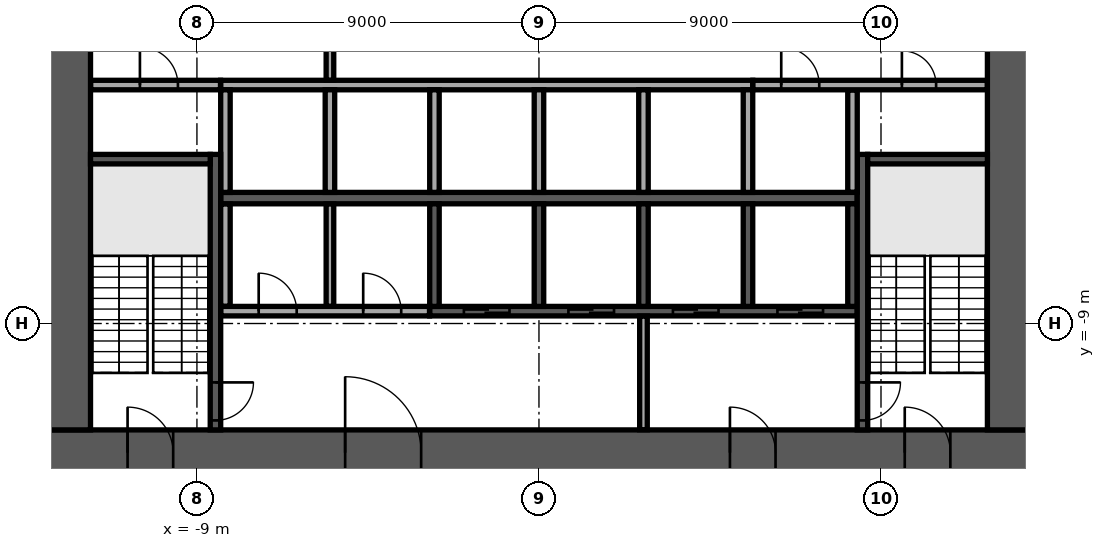
"""IFC4 building model, lengths in metres.
Left out: names, types, materials, properties, quantities, classifications, styles, units other than length and angle.
Written with IfcOpenShell. Run it as: python <this file> out.ifc"""

import sys

from ifc_helpers import new_model, si_unit, direction, frame, frame_2d, origin, place, context, subcontext, project, spatial, rectangle, extrude, element, fill, save


model = new_model("IFC4")
c1 = context("Model", 3, precision=1e-05, world=origin(), true_north=direction((0.0, 1.0)))
c2 = subcontext(c1, "Body", "Model", "MODEL_VIEW")
j1 = project(units=[si_unit("LENGTHUNIT", "METRE"), si_unit("PLANEANGLEUNIT", "RADIAN")], contexts=[c1])
p1 = place(None, origin())
s1 = spatial("IfcSite", under=j1, at=p1, CompositionType="ELEMENT")
p2 = place(p1, origin())
s2 = spatial("IfcBuilding", under=s1, at=p2, CompositionType="ELEMENT")
p3 = place(p2, frame((0.0, 0.0, 13.5)))
s3 = spatial("IfcBuildingStorey", under=s2, at=p3, CompositionType="ELEMENT", Elevation=13.5)
p4 = place(p3, frame((-13.0, -12.4, 0.0), z_axis=(0.0, 0.0, 1.0), x_axis=(1.0, 0.0, 0.0)))
e1 = element("IfcWall", 1, at=p4, inside=s3, PredefinedType="SHEAR", context=c2, shape_type="SweptSolid", body=[
    extrude(rectangle(XDim=26.0, YDim=1.2, at=frame_2d((13.0, 0.0))), origin(), (0.0, 0.0, 1.0), 4.1),
])
p5 = place(p4, frame((7.9, 0.0, 0.0)))
e2 = element("IfcOpeningElement", 2, at=p5, cuts=e1, PredefinedType="OPENING", context=c2, shape_type="SweptSolid", body=[
    extrude(rectangle(XDim=2.0, YDim=2.1, at=frame_2d((1.0, 1.05))), frame((0.0, 0.61, 0.0), z_axis=(0.0, -1.0, 0.0), x_axis=(1.0, 0.0, 0.0)), (0.0, 0.0, 1.0), 1.22),
])
p6 = place(p4, frame((18.025, 0.0, 0.0)))
e3 = element("IfcOpeningElement", 3, at=p6, cuts=e1, PredefinedType="OPENING", context=c2, shape_type="SweptSolid", body=[
    extrude(rectangle(XDim=1.2, YDim=2.1, at=frame_2d((0.6, 1.05))), frame((0.0, 0.61, 0.0), z_axis=(0.0, -1.0, 0.0), x_axis=(1.0, 0.0, 0.0)), (0.0, 0.0, 1.0), 1.22),
])
p7 = place(p4, frame((2.175, 0.0, 0.0)))
e4 = element("IfcOpeningElement", 4, at=p7, cuts=e1, PredefinedType="OPENING", context=c2, shape_type="SweptSolid", body=[
    extrude(rectangle(XDim=1.2, YDim=2.1, at=frame_2d((0.6, 1.05))), frame((0.0, 0.61, 0.0), z_axis=(0.0, -1.0, 0.0), x_axis=(1.0, 0.0, 0.0)), (0.0, 0.0, 1.0), 1.22),
])
p8 = place(p4, frame((22.625, 0.0, 0.0)))
e5 = element("IfcOpeningElement", 5, at=p8, cuts=e1, PredefinedType="OPENING", context=c2, shape_type="SweptSolid", body=[
    extrude(rectangle(XDim=1.2, YDim=2.1, at=frame_2d((0.6, 1.05))), frame((0.0, 0.61, 0.0), z_axis=(0.0, -1.0, 0.0), x_axis=(1.0, 0.0, 0.0)), (0.0, 0.0, 1.0), 1.22),
])
p9 = place(p3, frame((12.4, -11.8, 0.0), z_axis=(0.0, 0.0, 1.0), x_axis=(0.0, 1.0, 0.0)))
e6 = element("IfcWall", 6, at=p9, inside=s3, PredefinedType="SHEAR", context=c2, shape_type="SweptSolid", body=[
    extrude(rectangle(XDim=23.6, YDim=1.2, at=frame_2d((11.8, 0.0))), origin(), (0.0, 0.0, 1.0), 4.1),
])
p10 = place(p9, frame((10.6, 0.0, 0.0)))
e7 = element("IfcOpeningElement", 7, at=p10, cuts=e6, PredefinedType="OPENING", context=c2, shape_type="SweptSolid", body=[
    extrude(rectangle(XDim=2.4, YDim=2.4, at=frame_2d((1.2, 1.2))), frame((0.0, 0.61, 0.0), z_axis=(0.0, -1.0, 0.0), x_axis=(1.0, 0.0, 0.0)), (0.0, 0.0, 1.0), 1.22),
])
p11 = place(p3, frame((-12.4, -11.8, 0.0), z_axis=(0.0, 0.0, 1.0), x_axis=(0.0, 1.0, 0.0)))
e8 = element("IfcWall", 8, at=p11, inside=s3, PredefinedType="SHEAR", context=c2, shape_type="SweptSolid", body=[
    extrude(rectangle(XDim=23.6, YDim=1.2, at=frame_2d((11.8, 0.0))), origin(), (0.0, 0.0, 1.0), 4.1),
])
p12 = place(p11, frame((10.6, 0.0, 0.0)))
e9 = element("IfcOpeningElement", 9, at=p12, cuts=e8, PredefinedType="OPENING", context=c2, shape_type="SweptSolid", body=[
    extrude(rectangle(XDim=2.4, YDim=2.4, at=frame_2d((1.2, 1.2))), frame((0.0, 0.61, 0.0), z_axis=(0.0, -1.0, 0.0), x_axis=(1.0, 0.0, 0.0)), (0.0, 0.0, 1.0), 1.22),
])
p13 = place(p3, frame((-8.375, -5.7, 0.0), z_axis=(0.0, 0.0, 1.0), x_axis=(1.0, 0.0, 0.0)))
e10 = element("IfcWall", 10, at=p13, inside=s3, PredefinedType="SOLIDWALL", context=c2, shape_type="SweptSolid", body=[
    extrude(rectangle(XDim=16.75, YDim=0.3, at=frame_2d((8.375, 0.0))), origin(), (0.0, 0.0, 1.0), 4.1),
])
p14 = place(p3, frame((-8.375, -2.725, 0.0), z_axis=(0.0, 0.0, 1.0), x_axis=(1.0, 0.0, 0.0)))
e11 = element("IfcWall", 11, at=p14, inside=s3, PredefinedType="SOLIDWALL", context=c2, shape_type="SweptSolid", body=[
    extrude(rectangle(XDim=14.0, YDim=0.25, at=frame_2d((7.0, 0.0))), origin(), (0.0, 0.0, 1.0), 4.1),
])
for number, where, z_axis, x_axis in (
    (12, (-8.25, -5.55, 0.0), (0.0, 0.0, 1.0), (0.0, 1.0, 0.0)),
    (13, (-5.5, -5.55, 0.0), (0.0, 0.0, 1.0), (0.0, 1.0, 0.0)),
    (14, (-2.75, -5.55, 0.0), (0.0, 0.0, 1.0), (0.0, 1.0, 0.0)),
    (15, (0.0, -5.55, 0.0), (0.0, 0.0, 1.0), (0.0, 1.0, 0.0)),
    (16, (2.75, -5.55, 0.0), (0.0, 0.0, 1.0), (0.0, 1.0, 0.0)),
    (17, (5.5, -5.55, 0.0), (0.0, 0.0, 1.0), (0.0, 1.0, 0.0)),
):
    element("IfcWall", number, at=place(p3, frame(where, z_axis=z_axis, x_axis=x_axis)), inside=s3, PredefinedType="SOLIDWALL", context=c2, shape_type="SweptSolid", body=[
        extrude(rectangle(XDim=2.7, YDim=0.25, at=frame_2d((1.35, 0.0))), origin(), (0.0, 0.0, 1.0), 4.1),
    ])
p15 = place(p3, frame((-2.875, -8.675, 0.0), z_axis=(0.0, 0.0, 1.0), x_axis=(1.0, 0.0, 0.0)))
e18 = element("IfcWall", 18, at=p15, inside=s3, PredefinedType="SOLIDWALL", context=c2, shape_type="SweptSolid", body=[
    extrude(rectangle(XDim=11.25, YDim=0.25, at=frame_2d((5.625, 0.0))), origin(), (0.0, 0.0, 1.0), 4.1),
])
p16 = place(p15, frame((0.9, 0.0, 0.0)))
e19 = element("IfcOpeningElement", 19, at=p16, cuts=e18, PredefinedType="OPENING", context=c2, shape_type="SweptSolid", body=[
    extrude(rectangle(XDim=1.2, YDim=2.1, at=frame_2d((0.6, 1.05))), frame((0.0, 0.135, 0.0), z_axis=(0.0, -1.0, 0.0), x_axis=(1.0, 0.0, 0.0)), (0.0, 0.0, 1.0), 0.27),
])
p17 = place(p15, frame((3.65, 0.0, 0.0)))
e20 = element("IfcOpeningElement", 20, at=p17, cuts=e18, PredefinedType="OPENING", context=c2, shape_type="SweptSolid", body=[
    extrude(rectangle(XDim=1.2, YDim=2.1, at=frame_2d((0.6, 1.05))), frame((0.0, 0.135, 0.0), z_axis=(0.0, -1.0, 0.0), x_axis=(1.0, 0.0, 0.0)), (0.0, 0.0, 1.0), 0.27),
])
p18 = place(p15, frame((6.4, 0.0, 0.0)))
e21 = element("IfcOpeningElement", 21, at=p18, cuts=e18, PredefinedType="OPENING", context=c2, shape_type="SweptSolid", body=[
    extrude(rectangle(XDim=1.2, YDim=2.1, at=frame_2d((0.6, 1.05))), frame((0.0, 0.135, 0.0), z_axis=(0.0, -1.0, 0.0), x_axis=(1.0, 0.0, 0.0)), (0.0, 0.0, 1.0), 0.27),
])
p19 = place(p15, frame((9.15, 0.0, 0.0)))
e22 = element("IfcOpeningElement", 22, at=p19, cuts=e18, PredefinedType="OPENING", context=c2, shape_type="SweptSolid", body=[
    extrude(rectangle(XDim=1.2, YDim=2.1, at=frame_2d((0.6, 1.05))), frame((0.0, 0.135, 0.0), z_axis=(0.0, -1.0, 0.0), x_axis=(1.0, 0.0, 0.0)), (0.0, 0.0, 1.0), 0.27),
])
for number, where, z_axis, x_axis in (
    (23, (-2.75, -8.55, 0.0), (0.0, 0.0, 1.0), (0.0, 1.0, 0.0)),
    (24, (0.0, -8.55, 0.0), (0.0, 0.0, 1.0), (0.0, 1.0, 0.0)),
    (25, (2.75, -8.55, 0.0), (0.0, 0.0, 1.0), (0.0, 1.0, 0.0)),
    (26, (5.5, -8.55, 0.0), (0.0, 0.0, 1.0), (0.0, 1.0, 0.0)),
    (27, (8.25, -8.55, 0.0), (0.0, 0.0, 1.0), (0.0, 1.0, 0.0)),
):
    element("IfcWall", number, at=place(p3, frame(where, z_axis=z_axis, x_axis=x_axis)), inside=s3, PredefinedType="SOLIDWALL", context=c2, shape_type="SweptSolid", body=[
        extrude(rectangle(XDim=2.7, YDim=0.25, at=frame_2d((1.35, 0.0))), origin(), (0.0, 0.0, 1.0), 4.1),
    ])
p20 = place(p3, frame((-8.512, -4.55, 0.0), z_axis=(0.0, 0.0, 1.0), x_axis=(0.0, -1.0, 0.0)))
e28 = element("IfcWall", 28, at=p20, inside=s3, PredefinedType="SOLIDWALL", context=c2, shape_type="SweptSolid", body=[
    extrude(rectangle(XDim=7.25, YDim=0.275, at=frame_2d((3.625, 0.0))), origin(), (0.0, 0.0, 1.0), 4.1),
])
p21 = place(p20, frame((6.0, 0.0, 0.0)))
e29 = element("IfcOpeningElement", 29, at=p21, cuts=e28, PredefinedType="OPENING", context=c2, shape_type="SweptSolid", body=[
    extrude(rectangle(XDim=1.0, YDim=2.1, at=frame_2d((0.5, 1.05))), frame((0.0, 0.147, 0.0), z_axis=(0.0, -1.0, 0.0), x_axis=(1.0, 0.0, 0.0)), (0.0, 0.0, 1.0), 0.295),
])
p22 = place(p3, frame((-8.65, -4.675, 0.0), z_axis=(0.0, 0.0, 1.0), x_axis=(-1.0, 0.0, 0.0)))
e30 = element("IfcWall", 30, at=p22, inside=s3, PredefinedType="SOLIDWALL", context=c2, shape_type="SweptSolid", body=[
    extrude(rectangle(XDim=3.15, YDim=0.25, at=frame_2d((1.575, 0.0))), origin(), (0.0, 0.0, 1.0), 4.1),
])
p23 = place(p3, frame((8.512, -4.55, 0.0), z_axis=(0.0, 0.0, 1.0), x_axis=(0.0, -1.0, 0.0)))
e31 = element("IfcWall", 31, at=p23, inside=s3, PredefinedType="SOLIDWALL", context=c2, shape_type="SweptSolid", body=[
    extrude(rectangle(XDim=7.25, YDim=0.275, at=frame_2d((3.625, 0.0))), origin(), (0.0, 0.0, 1.0), 4.1),
])
p24 = place(p23, frame((6.0, 0.0, 0.0)))
e32 = element("IfcOpeningElement", 32, at=p24, cuts=e31, PredefinedType="OPENING", context=c2, shape_type="SweptSolid", body=[
    extrude(rectangle(XDim=1.0, YDim=2.1, at=frame_2d((0.5, 1.05))), frame((0.0, 0.147, 0.0), z_axis=(0.0, -1.0, 0.0), x_axis=(1.0, 0.0, 0.0)), (0.0, 0.0, 1.0), 0.295),
])
p25 = place(p3, frame((8.65, -4.675, 0.0), z_axis=(0.0, 0.0, 1.0), x_axis=(1.0, 0.0, 0.0)))
e33 = element("IfcWall", 33, at=p25, inside=s3, PredefinedType="SOLIDWALL", context=c2, shape_type="SweptSolid", body=[
    extrude(rectangle(XDim=3.15, YDim=0.25, at=frame_2d((1.575, 0.0))), origin(), (0.0, 0.0, 1.0), 4.1),
])
p26 = place(p3, frame((2.75, -11.795, 0.0), z_axis=(0.0, 0.0, 1.0), x_axis=(0.0, 1.0, 0.0)))
e34 = element("IfcWall", 34, at=p26, inside=s3, PredefinedType="PARTITIONING", context=c2, shape_type="SweptSolid", body=[
    extrude(rectangle(XDim=2.99, YDim=0.2, at=frame_2d((1.495, 0.0))), origin(), (0.0, 0.0, 1.0), 4.1),
])
p27 = place(p3, frame((-8.37, -8.675, 0.0), z_axis=(0.0, 0.0, 1.0), x_axis=(1.0, 0.0, 0.0)))
e35 = element("IfcWall", 35, at=p27, inside=s3, PredefinedType="PARTITIONING", context=c2, shape_type="SweptSolid", body=[
    extrude(rectangle(XDim=5.49, YDim=0.25, at=frame_2d((2.745, 0.0))), origin(), (0.0, 0.0, 1.0), 4.1),
])
p28 = place(p27, frame((0.995, 0.0, 0.0)))
e36 = element("IfcOpeningElement", 36, at=p28, cuts=e35, PredefinedType="OPENING", context=c2, shape_type="SweptSolid", body=[
    extrude(rectangle(XDim=1.0, YDim=2.1, at=frame_2d((0.5, 1.05))), frame((0.0, 0.135, 0.0), z_axis=(0.0, -1.0, 0.0), x_axis=(1.0, 0.0, 0.0)), (0.0, 0.0, 1.0), 0.27),
])
p29 = place(p27, frame((3.745, 0.0, 0.0)))
e37 = element("IfcOpeningElement", 37, at=p29, cuts=e35, PredefinedType="OPENING", context=c2, shape_type="SweptSolid", body=[
    extrude(rectangle(XDim=1.0, YDim=2.1, at=frame_2d((0.5, 1.05))), frame((0.0, 0.135, 0.0), z_axis=(0.0, -1.0, 0.0), x_axis=(1.0, 0.0, 0.0)), (0.0, 0.0, 1.0), 0.27),
])
p30 = place(p3, frame((-8.25, -8.545, 0.0), z_axis=(0.0, 0.0, 1.0), x_axis=(0.0, 1.0, 0.0)))
e38 = element("IfcWall", 38, at=p30, inside=s3, PredefinedType="PARTITIONING", context=c2, shape_type="SweptSolid", body=[
    extrude(rectangle(XDim=2.69, YDim=0.25, at=frame_2d((1.345, 0.0))), origin(), (0.0, 0.0, 1.0), 4.1),
])
p31 = place(p3, frame((-5.5, -8.545, 0.0), z_axis=(0.0, 0.0, 1.0), x_axis=(0.0, 1.0, 0.0)))
e39 = element("IfcWall", 39, at=p31, inside=s3, PredefinedType="PARTITIONING", context=c2, shape_type="SweptSolid", body=[
    extrude(rectangle(XDim=2.69, YDim=0.2, at=frame_2d((1.345, 0.0))), origin(), (0.0, 0.0, 1.0), 4.1),
])
p32 = place(p3, frame((8.25, -5.545, 0.0), z_axis=(0.0, 0.0, 1.0), x_axis=(0.0, 1.0, 0.0)))
e40 = element("IfcWall", 40, at=p32, inside=s3, PredefinedType="PARTITIONING", context=c2, shape_type="SweptSolid", body=[
    extrude(rectangle(XDim=2.69, YDim=0.25, at=frame_2d((1.345, 0.0))), origin(), (0.0, 0.0, 1.0), 4.1),
])
p33 = place(p3, frame((-11.795, -2.725, 0.0), z_axis=(0.0, 0.0, 1.0), x_axis=(1.0, 0.0, 0.0)))
e41 = element("IfcWall", 41, at=p33, inside=s3, PredefinedType="PARTITIONING", context=c2, shape_type="SweptSolid", body=[
    extrude(rectangle(XDim=3.415, YDim=0.25, at=frame_2d((1.708, 0.0))), origin(), (0.0, 0.0, 1.0), 4.1),
])
p34 = place(p33, frame((1.295, 0.0, 0.0)))
e42 = element("IfcOpeningElement", 42, at=p34, cuts=e41, PredefinedType="OPENING", context=c2, shape_type="SweptSolid", body=[
    extrude(rectangle(XDim=1.0, YDim=2.1, at=frame_2d((0.5, 1.05))), frame((0.0, 0.135, 0.0), z_axis=(0.0, -1.0, 0.0), x_axis=(1.0, 0.0, 0.0)), (0.0, 0.0, 1.0), 0.27),
])
p35 = place(p3, frame((5.63, -2.725, 0.0), z_axis=(0.0, 0.0, 1.0), x_axis=(1.0, 0.0, 0.0)))
e43 = element("IfcWall", 43, at=p35, inside=s3, PredefinedType="PARTITIONING", context=c2, shape_type="SweptSolid", body=[
    extrude(rectangle(XDim=6.165, YDim=0.25, at=frame_2d((3.083, 0.0))), origin(), (0.0, 0.0, 1.0), 4.1),
])
p36 = place(p35, frame((0.745, 0.0, 0.0)))
e44 = element("IfcOpeningElement", 44, at=p36, cuts=e43, PredefinedType="OPENING", context=c2, shape_type="SweptSolid", body=[
    extrude(rectangle(XDim=1.0, YDim=2.1, at=frame_2d((0.5, 1.05))), frame((0.0, 0.135, 0.0), z_axis=(0.0, -1.0, 0.0), x_axis=(1.0, 0.0, 0.0)), (0.0, 0.0, 1.0), 0.27),
])
p37 = place(p35, frame((3.92, 0.0, 0.0)))
e45 = element("IfcOpeningElement", 45, at=p37, cuts=e43, PredefinedType="OPENING", context=c2, shape_type="SweptSolid", body=[
    extrude(rectangle(XDim=0.9, YDim=2.1, at=frame_2d((0.45, 1.05))), frame((0.0, 0.135, 0.0), z_axis=(0.0, -1.0, 0.0), x_axis=(1.0, 0.0, 0.0)), (0.0, 0.0, 1.0), 0.27),
])
p38 = place(p3, frame((-5.5, -2.595, 0.0), z_axis=(0.0, 0.0, 1.0), x_axis=(0.0, 1.0, 0.0)))
e46 = element("IfcWall", 46, at=p38, inside=s3, PredefinedType="PARTITIONING", context=c2, shape_type="SweptSolid", body=[
    extrude(rectangle(XDim=5.19, YDim=0.2, at=frame_2d((2.595, 0.0))), origin(), (0.0, 0.0, 1.0), 4.1),
])
p39 = place(p38, frame((1.395, 0.0, 0.0)))
e47 = element("IfcOpeningElement", 47, at=p39, cuts=e46, PredefinedType="OPENING", context=c2, shape_type="SweptSolid", body=[
    extrude(rectangle(XDim=2.4, YDim=2.4, at=frame_2d((1.2, 1.2))), frame((0.0, 0.11, 0.0), z_axis=(0.0, -1.0, 0.0), x_axis=(1.0, 0.0, 0.0)), (0.0, 0.0, 1.0), 0.22),
])
p40 = place(p5, origin())
e48 = element("IfcDoor", 48, at=p40, inside=s3, OperationType="SINGLE_SWING_LEFT", PredefinedType="DOOR", context=c2, shape_type="SweptSolid", body=[
    extrude(rectangle(XDim=2.0, YDim=2.1, at=frame_2d((1.0, 1.05))), frame((0.0, 0.025, 0.0), z_axis=(0.0, -1.0, 0.0), x_axis=(1.0, 0.0, 0.0)), (0.0, 0.0, 1.0), 0.05),
])
fill(e2, e48)
p41 = place(p6, origin())
e49 = element("IfcDoor", 49, at=p41, inside=s3, OperationType="SINGLE_SWING_LEFT", PredefinedType="DOOR", context=c2, shape_type="SweptSolid", body=[
    extrude(rectangle(XDim=1.2, YDim=2.1, at=frame_2d((0.6, 1.05))), frame((0.0, 0.025, 0.0), z_axis=(0.0, -1.0, 0.0), x_axis=(1.0, 0.0, 0.0)), (0.0, 0.0, 1.0), 0.05),
])
fill(e3, e49)
p42 = place(p7, origin())
e50 = element("IfcDoor", 50, at=p42, inside=s3, OperationType="SINGLE_SWING_LEFT", PredefinedType="DOOR", context=c2, shape_type="SweptSolid", body=[
    extrude(rectangle(XDim=1.2, YDim=2.1, at=frame_2d((0.6, 1.05))), frame((0.0, 0.025, 0.0), z_axis=(0.0, -1.0, 0.0), x_axis=(1.0, 0.0, 0.0)), (0.0, 0.0, 1.0), 0.05),
])
fill(e4, e50)
p43 = place(p8, origin())
e51 = element("IfcDoor", 51, at=p43, inside=s3, OperationType="SINGLE_SWING_LEFT", PredefinedType="DOOR", context=c2, shape_type="SweptSolid", body=[
    extrude(rectangle(XDim=1.2, YDim=2.1, at=frame_2d((0.6, 1.05))), frame((0.0, 0.025, 0.0), z_axis=(0.0, -1.0, 0.0), x_axis=(1.0, 0.0, 0.0)), (0.0, 0.0, 1.0), 0.05),
])
fill(e5, e51)
p44 = place(p16, origin())
e52 = element("IfcDoor", 52, at=p44, inside=s3, OperationType="DOUBLE_DOOR_SLIDING", PredefinedType="DOOR", context=c2, shape_type="SweptSolid", body=[
    extrude(rectangle(XDim=1.2, YDim=2.1, at=frame_2d((0.6, 1.05))), frame((0.0, 0.025, 0.0), z_axis=(0.0, -1.0, 0.0), x_axis=(1.0, 0.0, 0.0)), (0.0, 0.0, 1.0), 0.05),
])
fill(e19, e52)
p45 = place(p17, origin())
e53 = element("IfcDoor", 53, at=p45, inside=s3, OperationType="DOUBLE_DOOR_SLIDING", PredefinedType="DOOR", context=c2, shape_type="SweptSolid", body=[
    extrude(rectangle(XDim=1.2, YDim=2.1, at=frame_2d((0.6, 1.05))), frame((0.0, 0.025, 0.0), z_axis=(0.0, -1.0, 0.0), x_axis=(1.0, 0.0, 0.0)), (0.0, 0.0, 1.0), 0.05),
])
fill(e20, e53)
p46 = place(p18, origin())
e54 = element("IfcDoor", 54, at=p46, inside=s3, OperationType="DOUBLE_DOOR_SLIDING", PredefinedType="DOOR", context=c2, shape_type="SweptSolid", body=[
    extrude(rectangle(XDim=1.2, YDim=2.1, at=frame_2d((0.6, 1.05))), frame((0.0, 0.025, 0.0), z_axis=(0.0, -1.0, 0.0), x_axis=(1.0, 0.0, 0.0)), (0.0, 0.0, 1.0), 0.05),
])
fill(e21, e54)
p47 = place(p19, origin())
e55 = element("IfcDoor", 55, at=p47, inside=s3, OperationType="DOUBLE_DOOR_SLIDING", PredefinedType="DOOR", context=c2, shape_type="SweptSolid", body=[
    extrude(rectangle(XDim=1.2, YDim=2.1, at=frame_2d((0.6, 1.05))), frame((0.0, 0.025, 0.0), z_axis=(0.0, -1.0, 0.0), x_axis=(1.0, 0.0, 0.0)), (0.0, 0.0, 1.0), 0.05),
])
fill(e22, e55)
p48 = place(p21, origin())
e56 = element("IfcDoor", 56, at=p48, inside=s3, OperationType="SINGLE_SWING_LEFT", PredefinedType="DOOR", context=c2, shape_type="SweptSolid", body=[
    extrude(rectangle(XDim=1.0, YDim=2.1, at=frame_2d((0.5, 1.05))), frame((0.0, 0.025, 0.0), z_axis=(0.0, -1.0, 0.0), x_axis=(1.0, 0.0, 0.0)), (0.0, 0.0, 1.0), 0.05),
])
fill(e29, e56)
p49 = place(p24, origin())
e57 = element("IfcDoor", 57, at=p49, inside=s3, OperationType="SINGLE_SWING_LEFT", PredefinedType="DOOR", context=c2, shape_type="SweptSolid", body=[
    extrude(rectangle(XDim=1.0, YDim=2.1, at=frame_2d((0.5, 1.05))), frame((0.0, 0.025, 0.0), z_axis=(0.0, -1.0, 0.0), x_axis=(1.0, 0.0, 0.0)), (0.0, 0.0, 1.0), 0.05),
])
fill(e32, e57)
p50 = place(p28, origin())
e58 = element("IfcDoor", 58, at=p50, inside=s3, OperationType="SINGLE_SWING_RIGHT", PredefinedType="DOOR", context=c2, shape_type="SweptSolid", body=[
    extrude(rectangle(XDim=1.0, YDim=2.1, at=frame_2d((0.5, 1.05))), frame((0.0, 0.025, 0.0), z_axis=(0.0, -1.0, 0.0), x_axis=(1.0, 0.0, 0.0)), (0.0, 0.0, 1.0), 0.05),
])
fill(e36, e58)
p51 = place(p29, origin())
e59 = element("IfcDoor", 59, at=p51, inside=s3, OperationType="SINGLE_SWING_RIGHT", PredefinedType="DOOR", context=c2, shape_type="SweptSolid", body=[
    extrude(rectangle(XDim=1.0, YDim=2.1, at=frame_2d((0.5, 1.05))), frame((0.0, 0.025, 0.0), z_axis=(0.0, -1.0, 0.0), x_axis=(1.0, 0.0, 0.0)), (0.0, 0.0, 1.0), 0.05),
])
fill(e37, e59)
p52 = place(p34, origin())
e60 = element("IfcDoor", 60, at=p52, inside=s3, OperationType="SINGLE_SWING_RIGHT", PredefinedType="DOOR", context=c2, shape_type="SweptSolid", body=[
    extrude(rectangle(XDim=1.0, YDim=2.1, at=frame_2d((0.5, 1.05))), frame((0.0, 0.025, 0.0), z_axis=(0.0, -1.0, 0.0), x_axis=(1.0, 0.0, 0.0)), (0.0, 0.0, 1.0), 0.05),
])
fill(e42, e60)
p53 = place(p36, origin())
e61 = element("IfcDoor", 61, at=p53, inside=s3, OperationType="SINGLE_SWING_RIGHT", PredefinedType="DOOR", context=c2, shape_type="SweptSolid", body=[
    extrude(rectangle(XDim=1.0, YDim=2.1, at=frame_2d((0.5, 1.05))), frame((0.0, 0.025, 0.0), z_axis=(0.0, -1.0, 0.0), x_axis=(1.0, 0.0, 0.0)), (0.0, 0.0, 1.0), 0.05),
])
fill(e44, e61)
p54 = place(p37, origin())
e62 = element("IfcDoor", 62, at=p54, inside=s3, OperationType="SINGLE_SWING_RIGHT", PredefinedType="DOOR", context=c2, shape_type="SweptSolid", body=[
    extrude(rectangle(XDim=0.9, YDim=2.1, at=frame_2d((0.45, 1.05))), frame((0.0, 0.025, 0.0), z_axis=(0.0, -1.0, 0.0), x_axis=(1.0, 0.0, 0.0)), (0.0, 0.0, 1.0), 0.05),
])
fill(e45, e62)
save(model, sys.argv[1])
